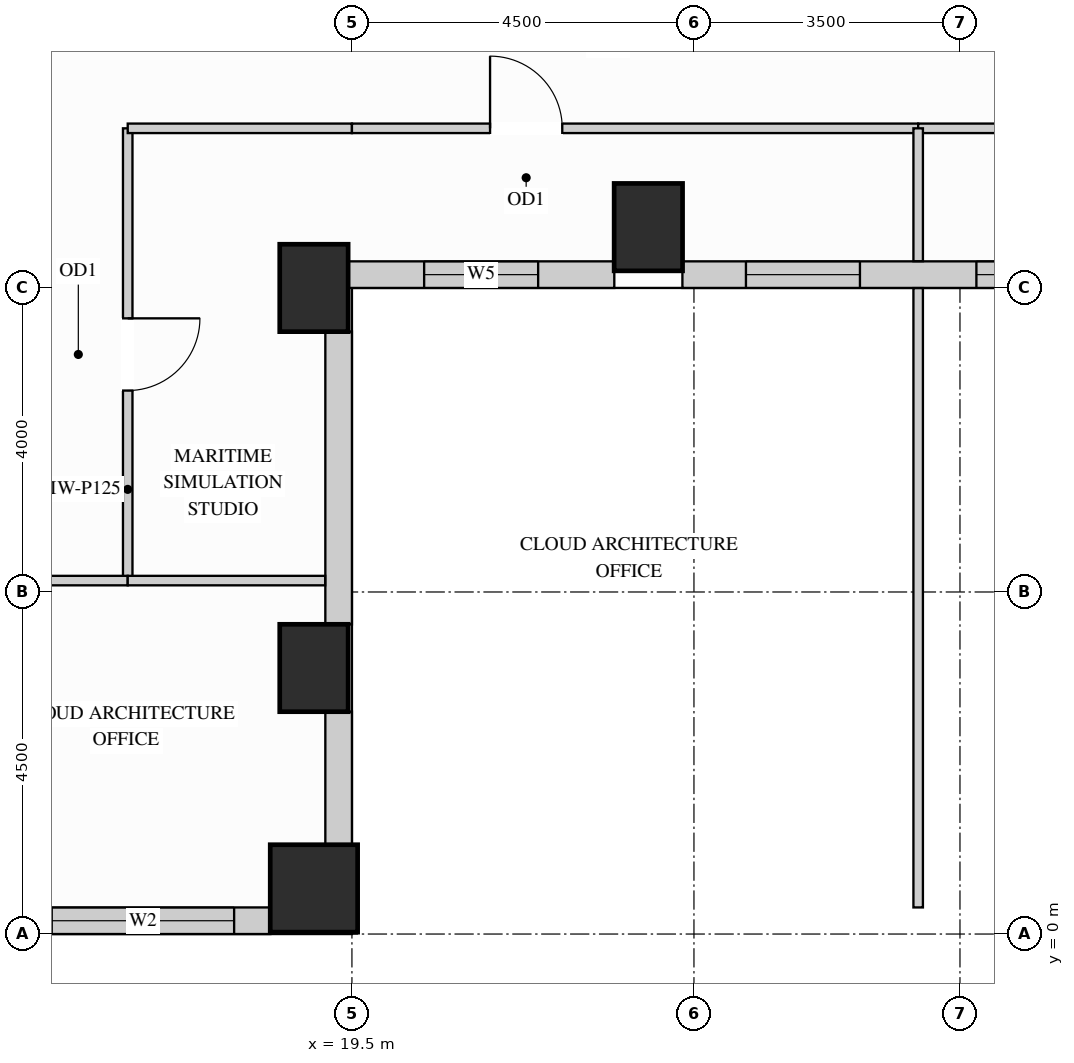
"""IFC4 building model, lengths in metres.
Left out: names, types, materials, properties, quantities, classifications, styles, units other than length and angle.
Written with IfcOpenShell. Run it as: python <this file> out.ifc"""

import sys

from ifc_helpers import new_model, si_unit, direction, frame, frame_2d, origin, origin_2d, place, context, subcontext, project, spatial, rectangle, extrude, source, transform, mapped, element, fill, save


model = new_model("IFC4")
c1 = context("Model", 3, precision=1e-05, world=origin(), true_north=direction((0.0, 1.0)))
c2 = subcontext(c1, "Body", "Model", "MODEL_VIEW")
j1 = project(units=[si_unit("LENGTHUNIT", "METRE"), si_unit("PLANEANGLEUNIT", "RADIAN")], contexts=[c1])
p1 = place(None, origin())
s1 = spatial("IfcSite", under=j1, at=p1, CompositionType="ELEMENT")
p2 = place(p1, origin())
s2 = spatial("IfcBuilding", under=s1, at=p2, CompositionType="ELEMENT")
p3 = place(p2, frame((0.0, 0.0, 127.8)))
s3 = spatial("IfcBuildingStorey", under=s2, at=p3, CompositionType="ELEMENT", Elevation=127.8)
m1 = source(origin(), c2, "Body", "SweptSolid", [
    extrude(rectangle(XDim=0.9, YDim=1.15, at=origin_2d()), origin(), (0.0, 0.0, 1.0), 3.38),
])
for number, where, z_axis, x_axis in (
    (1, (19.0, 3.5, 0.0), (0.0, 0.0, 1.0), (1.0, 0.0, 0.0)),
    (2, (19.0, 8.5, 0.0), (0.0, 0.0, 1.0), (1.0, 0.0, 0.0)),
    (3, (23.4, 9.3, 0.0), (0.0, 0.0, 1.0), (1.0, 0.0, 0.0)),
):
    element("IfcColumn", number, at=place(p3, frame(where, z_axis=z_axis, x_axis=x_axis)), inside=s3, PredefinedType="COLUMN", context=c2, shape_type="MappedRepresentation", body=[
        mapped(m1, transform((0.0, 0.0, 0.0), x_axis=(1.0, 0.0, 0.0), y_axis=(0.0, 1.0, 0.0), z_axis=(0.0, 0.0, 1.0))),
    ])
m2 = source(origin(), c2, "Body", "SweptSolid", [
    extrude(rectangle(XDim=1.15, YDim=1.15, at=origin_2d()), origin(), (0.0, 0.0, 1.0), 3.38),
])
p4 = place(p3, frame((19.0, 0.6, 0.0), z_axis=(0.0, 0.0, 1.0), x_axis=(1.0, 0.0, 0.0)))
e4 = element("IfcColumn", 4, at=p4, inside=s3, PredefinedType="COLUMN", context=c2, shape_type="MappedRepresentation", body=[
    mapped(m2, transform((0.0, 0.0, 0.0), x_axis=(1.0, 0.0, 0.0), y_axis=(0.0, 1.0, 0.0), z_axis=(0.0, 0.0, 1.0))),
])
p5 = place(p3, frame((15.073, 0.175, 0.0), z_axis=(0.0, 0.0, 1.0), x_axis=(1.0, 0.0, 0.0)))
e5 = element("IfcWall", 5, at=p5, inside=s3, PredefinedType="SOLIDWALL", context=c2, shape_type="SweptSolid", body=[
    extrude(rectangle(XDim=3.354, YDim=0.35, at=frame_2d((1.677, 0.0))), origin(), (0.0, 0.0, 1.0), 3.365),
])
p6 = place(p5, frame((0.477, 0.0, 0.78)))
e6 = element("IfcOpeningElement", 6, at=p6, cuts=e5, PredefinedType="OPENING", context=c2, shape_type="SweptSolid", body=[
    extrude(rectangle(XDim=2.4, YDim=2.1, at=frame_2d((1.2, 1.05))), frame((0.0, 0.185, 0.0), z_axis=(0.0, -1.0, 0.0), x_axis=(1.0, 0.0, 0.0)), (0.0, 0.0, 1.0), 0.37),
])
m3 = source(origin(), c2, "Body", "SweptSolid", [
    extrude(rectangle(XDim=1.754, YDim=0.35, at=frame_2d((0.877, 0.0))), origin(), (0.0, 0.0, 1.0), 2.519),
])
p7 = place(p3, frame((19.325, 1.173, 0.0), z_axis=(0.0, 0.0, 1.0), x_axis=(0.0, 1.0, 0.0)))
e7 = element("IfcWall", 7, at=p7, inside=s3, PredefinedType="SOLIDWALL", context=c2, shape_type="MappedRepresentation", body=[
    mapped(m3, transform((0.0, 0.0, 0.0), x_axis=(1.0, 0.0, 0.0), y_axis=(0.0, 1.0, 0.0), z_axis=(0.0, 0.0, 1.0))),
])
m4 = source(origin(), c2, "Body", "SweptSolid", [
    extrude(rectangle(XDim=3.854, YDim=0.35, at=frame_2d((1.927, 0.0))), origin(), (0.0, 0.0, 1.0), 2.519),
])
p8 = place(p3, frame((19.325, 4.073, 0.0), z_axis=(0.0, 0.0, 1.0), x_axis=(0.0, 1.0, 0.0)))
e8 = element("IfcWall", 8, at=p8, inside=s3, PredefinedType="SOLIDWALL", context=c2, shape_type="MappedRepresentation", body=[
    mapped(m4, transform((0.0, 0.0, 0.0), x_axis=(1.0, 0.0, 0.0), y_axis=(0.0, 1.0, 0.0), z_axis=(0.0, 0.0, 1.0))),
])
p9 = place(p3, frame((19.448, 8.675, 0.0), z_axis=(0.0, 0.0, 1.0), x_axis=(1.0, 0.0, 0.0)))
e9 = element("IfcWall", 9, at=p9, inside=s3, PredefinedType="SOLIDWALL", context=c2, shape_type="SweptSolid", body=[
    extrude(rectangle(XDim=3.504, YDim=0.35, at=frame_2d((1.752, 0.0))), origin(), (0.0, 0.0, 1.0), 3.365),
])
p10 = place(p9, frame((1.002, 0.0, 0.78)))
e10 = element("IfcOpeningElement", 10, at=p10, cuts=e9, PredefinedType="OPENING", context=c2, shape_type="SweptSolid", body=[
    extrude(rectangle(XDim=1.5, YDim=2.0, at=frame_2d((0.75, 1.0))), frame((0.0, 0.185, 0.0), z_axis=(0.0, -1.0, 0.0), x_axis=(1.0, 0.0, 0.0)), (0.0, 0.0, 1.0), 0.37),
])
p11 = place(p3, frame((23.848, 8.675, 0.0), z_axis=(0.0, 0.0, 1.0), x_axis=(1.0, 0.0, 0.0)))
e11 = element("IfcWall", 11, at=p11, inside=s3, PredefinedType="SOLIDWALL", context=c2, shape_type="SweptSolid", body=[
    extrude(rectangle(XDim=6.204, YDim=0.35, at=frame_2d((3.102, 0.0))), origin(), (0.0, 0.0, 1.0), 3.365),
])
p12 = place(p11, frame((0.836, 0.0, 0.78)))
e12 = element("IfcOpeningElement", 12, at=p12, cuts=e11, PredefinedType="OPENING", context=c2, shape_type="SweptSolid", body=[
    extrude(rectangle(XDim=1.5, YDim=2.0, at=frame_2d((0.75, 1.0))), frame((0.0, 0.185, 0.0), z_axis=(0.0, -1.0, 0.0), x_axis=(1.0, 0.0, 0.0)), (0.0, 0.0, 1.0), 0.37),
])
p13 = place(p11, frame((3.868, 0.0, 0.78)))
e13 = element("IfcOpeningElement", 13, at=p13, cuts=e11, PredefinedType="OPENING", context=c2, shape_type="SweptSolid", body=[
    extrude(rectangle(XDim=1.5, YDim=2.0, at=frame_2d((0.75, 1.0))), frame((0.0, 0.185, 0.0), z_axis=(0.0, -1.0, 0.0), x_axis=(1.0, 0.0, 0.0)), (0.0, 0.0, 1.0), 0.37),
])
p14 = place(p3, frame((16.55, 4.65, 0.0), z_axis=(0.0, 0.0, 1.0), x_axis=(0.0, 1.0, 0.0)))
e14 = element("IfcWall", 14, at=p14, inside=s3, PredefinedType="PARTITIONING", context=c2, shape_type="SweptSolid", body=[
    extrude(rectangle(XDim=5.95, YDim=0.125, at=frame_2d((2.975, 0.0))), origin(), (0.0, 0.0, 1.0), 3.365),
])
p15 = place(p14, frame((2.5, 0.0, 0.0)))
e15 = element("IfcOpeningElement", 15, at=p15, cuts=e14, PredefinedType="OPENING", context=c2, shape_type="SweptSolid", body=[
    extrude(rectangle(XDim=0.95, YDim=2.15, at=frame_2d((0.475, 1.075))), frame((0.0, 0.073, 0.0), z_axis=(0.0, -1.0, 0.0), x_axis=(1.0, 0.0, 0.0)), (0.0, 0.0, 1.0), 0.145),
])
m5 = source(origin(), c2, "Body", "SweptSolid", [
    extrude(rectangle(XDim=2.95, YDim=0.125, at=frame_2d((1.475, 0.0))), origin(), (0.0, 0.0, 1.0), 3.365),
])
p16 = place(p3, frame((16.55, 10.6, 0.0), z_axis=(0.0, 0.0, 1.0), x_axis=(1.0, 0.0, 0.0)))
e16 = element("IfcWall", 16, at=p16, inside=s3, PredefinedType="PARTITIONING", context=c2, shape_type="MappedRepresentation", body=[
    mapped(m5, transform((0.0, 0.0, 0.0), x_axis=(1.0, 0.0, 0.0), y_axis=(0.0, 1.0, 0.0), z_axis=(0.0, 0.0, 1.0))),
])
p17 = place(p3, frame((19.5, 10.6, 0.0), z_axis=(0.0, 0.0, 1.0), x_axis=(1.0, 0.0, 0.0)))
e17 = element("IfcWall", 17, at=p17, inside=s3, PredefinedType="PARTITIONING", context=c2, shape_type="SweptSolid", body=[
    extrude(rectangle(XDim=7.45, YDim=0.125, at=frame_2d((3.725, 0.0))), origin(), (0.0, 0.0, 1.0), 3.365),
])
p18 = place(p17, frame((1.817, 0.0, 0.0)))
e18 = element("IfcOpeningElement", 18, at=p18, cuts=e17, PredefinedType="OPENING", context=c2, shape_type="SweptSolid", body=[
    extrude(rectangle(XDim=0.95, YDim=2.15, at=frame_2d((0.475, 1.075))), frame((0.0, 0.073, 0.0), z_axis=(0.0, -1.0, 0.0), x_axis=(1.0, 0.0, 0.0)), (0.0, 0.0, 1.0), 0.145),
])
p19 = place(p3, frame((26.95, 10.6, 0.0), z_axis=(0.0, 0.0, 1.0), x_axis=(1.0, 0.0, 0.0)))
e19 = element("IfcWall", 19, at=p19, inside=s3, PredefinedType="PARTITIONING", context=c2, shape_type="SweptSolid", body=[
    extrude(rectangle(XDim=7.45, YDim=0.125, at=frame_2d((3.725, 0.0))), origin(), (0.0, 0.0, 1.0), 3.365),
])
p20 = place(p19, frame((4.683, 0.0, 0.0)))
e20 = element("IfcOpeningElement", 20, at=p20, cuts=e19, PredefinedType="OPENING", context=c2, shape_type="SweptSolid", body=[
    extrude(rectangle(XDim=0.95, YDim=2.15, at=frame_2d((0.475, 1.075))), frame((0.0, 0.073, 0.0), z_axis=(0.0, -1.0, 0.0), x_axis=(1.0, 0.0, 0.0)), (0.0, 0.0, 1.0), 0.145),
])
m6 = source(origin(), c2, "Body", "SweptSolid", [
    extrude(rectangle(XDim=8.148, YDim=0.125, at=frame_2d((4.074, 0.0))), origin(), (0.0, 0.0, 1.0), 3.365),
])
p21 = place(p3, frame((26.95, 0.35, 0.0), z_axis=(0.0, 0.0, 1.0), x_axis=(0.0, 1.0, 0.0)))
e21 = element("IfcWall", 21, at=p21, inside=s3, PredefinedType="PARTITIONING", context=c2, shape_type="MappedRepresentation", body=[
    mapped(m6, transform((0.0, 0.0, 0.0), x_axis=(1.0, 0.0, 0.0), y_axis=(0.0, 1.0, 0.0), z_axis=(0.0, 0.0, 1.0))),
])
m7 = source(origin(), c2, "Body", "SweptSolid", [
    extrude(rectangle(XDim=1.748, YDim=0.125, at=frame_2d((0.874, 0.0))), origin(), (0.0, 0.0, 1.0), 3.365),
])
p22 = place(p3, frame((26.95, 8.852, 0.0), z_axis=(0.0, 0.0, 1.0), x_axis=(0.0, 1.0, 0.0)))
e22 = element("IfcWall", 22, at=p22, inside=s3, PredefinedType="PARTITIONING", context=c2, shape_type="MappedRepresentation", body=[
    mapped(m7, transform((0.0, 0.0, 0.0), x_axis=(1.0, 0.0, 0.0), y_axis=(0.0, 1.0, 0.0), z_axis=(0.0, 0.0, 1.0))),
])
p23 = place(p3, frame((10.544, 4.65, 0.0), z_axis=(0.0, 0.0, 1.0), x_axis=(1.0, 0.0, 0.0)))
e23 = element("IfcWall", 23, at=p23, inside=s3, PredefinedType="PARTITIONING", context=c2, shape_type="SweptSolid", body=[
    extrude(rectangle(XDim=6.006, YDim=0.125, at=frame_2d((3.003, 0.0))), origin(), (0.0, 0.0, 1.0), 2.828),
])
p24 = place(p23, frame((2.528, 0.0, 0.0)))
e24 = element("IfcOpeningElement", 24, at=p24, cuts=e23, PredefinedType="OPENING", context=c2, shape_type="SweptSolid", body=[
    extrude(rectangle(XDim=0.95, YDim=2.15, at=frame_2d((0.475, 1.075))), frame((0.0, 0.073, 0.0), z_axis=(0.0, -1.0, 0.0), x_axis=(1.0, 0.0, 0.0)), (0.0, 0.0, 1.0), 0.145),
])
m8 = source(origin(), c2, "Body", "SweptSolid", [
    extrude(rectangle(XDim=2.598, YDim=0.125, at=frame_2d((1.299, 0.0))), origin(), (0.0, 0.0, 1.0), 2.828),
])
p25 = place(p3, frame((16.55, 4.65, 0.0), z_axis=(0.0, 0.0, 1.0), x_axis=(1.0, 0.0, 0.0)))
e25 = element("IfcWall", 25, at=p25, inside=s3, PredefinedType="PARTITIONING", context=c2, shape_type="MappedRepresentation", body=[
    mapped(m8, transform((0.0, 0.0, 0.0), x_axis=(1.0, 0.0, 0.0), y_axis=(0.0, 1.0, 0.0), z_axis=(0.0, 0.0, 1.0))),
])
m9 = source(origin(), c2, "Body", "SweptSolid", [
    extrude(rectangle(XDim=0.95, YDim=2.15, at=frame_2d((0.475, 1.075))), frame((0.0, 0.025, 0.0), z_axis=(0.0, -1.0, 0.0), x_axis=(1.0, 0.0, 0.0)), (0.0, 0.0, 1.0), 0.05),
])
p26 = place(p15, origin())
e26 = element("IfcDoor", 26, at=p26, inside=s3, OperationType="SINGLE_SWING_RIGHT", PredefinedType="DOOR", context=c2, shape_type="MappedRepresentation", body=[
    mapped(m9, transform((0.0, 0.0, 0.0), x_axis=(1.0, 0.0, 0.0), y_axis=(0.0, 1.0, 0.0), z_axis=(0.0, 0.0, 1.0))),
])
fill(e15, e26)
p27 = place(p18, origin())
e27 = element("IfcDoor", 27, at=p27, inside=s3, OperationType="SINGLE_SWING_LEFT", PredefinedType="DOOR", context=c2, shape_type="MappedRepresentation", body=[
    mapped(m9, transform((0.0, 0.0, 0.0), x_axis=(1.0, 0.0, 0.0), y_axis=(0.0, 1.0, 0.0), z_axis=(0.0, 0.0, 1.0))),
])
fill(e18, e27)
m10 = source(origin(), c2, "Body", "SweptSolid", [
    extrude(rectangle(XDim=2.4, YDim=2.1, at=frame_2d((1.2, 1.05))), frame((0.0, 0.03, 0.0), z_axis=(0.0, -1.0, 0.0), x_axis=(1.0, 0.0, 0.0)), (0.0, 0.0, 1.0), 0.06),
])
p28 = place(p6, origin())
e28 = element("IfcWindow", 28, at=p28, inside=s3, PartitioningType="SINGLE_PANEL", PredefinedType="WINDOW", context=c2, shape_type="MappedRepresentation", body=[
    mapped(m10, transform((0.0, 0.0, 0.0), x_axis=(1.0, 0.0, 0.0), y_axis=(0.0, 1.0, 0.0), z_axis=(0.0, 0.0, 1.0))),
])
fill(e6, e28)
m11 = source(origin(), c2, "Body", "SweptSolid", [
    extrude(rectangle(XDim=1.5, YDim=2.0, at=frame_2d((0.75, 1.0))), frame((0.0, 0.03, 0.0), z_axis=(0.0, -1.0, 0.0), x_axis=(1.0, 0.0, 0.0)), (0.0, 0.0, 1.0), 0.06),
])
p29 = place(p10, origin())
e29 = element("IfcWindow", 29, at=p29, inside=s3, PartitioningType="SINGLE_PANEL", PredefinedType="WINDOW", context=c2, shape_type="MappedRepresentation", body=[
    mapped(m11, transform((0.0, 0.0, 0.0), x_axis=(1.0, 0.0, 0.0), y_axis=(0.0, 1.0, 0.0), z_axis=(0.0, 0.0, 1.0))),
])
fill(e10, e29)
p30 = place(p12, origin())
e30 = element("IfcWindow", 30, at=p30, inside=s3, PartitioningType="SINGLE_PANEL", PredefinedType="WINDOW", context=c2, shape_type="MappedRepresentation", body=[
    mapped(m11, transform((0.0, 0.0, 0.0), x_axis=(1.0, 0.0, 0.0), y_axis=(0.0, 1.0, 0.0), z_axis=(0.0, 0.0, 1.0))),
])
fill(e12, e30)
p31 = place(p13, origin())
e31 = element("IfcWindow", 31, at=p31, inside=s3, PartitioningType="SINGLE_PANEL", PredefinedType="WINDOW", context=c2, shape_type="MappedRepresentation", body=[
    mapped(m11, transform((0.0, 0.0, 0.0), x_axis=(1.0, 0.0, 0.0), y_axis=(0.0, 1.0, 0.0), z_axis=(0.0, 0.0, 1.0))),
])
fill(e13, e31)
save(model, sys.argv[1])
